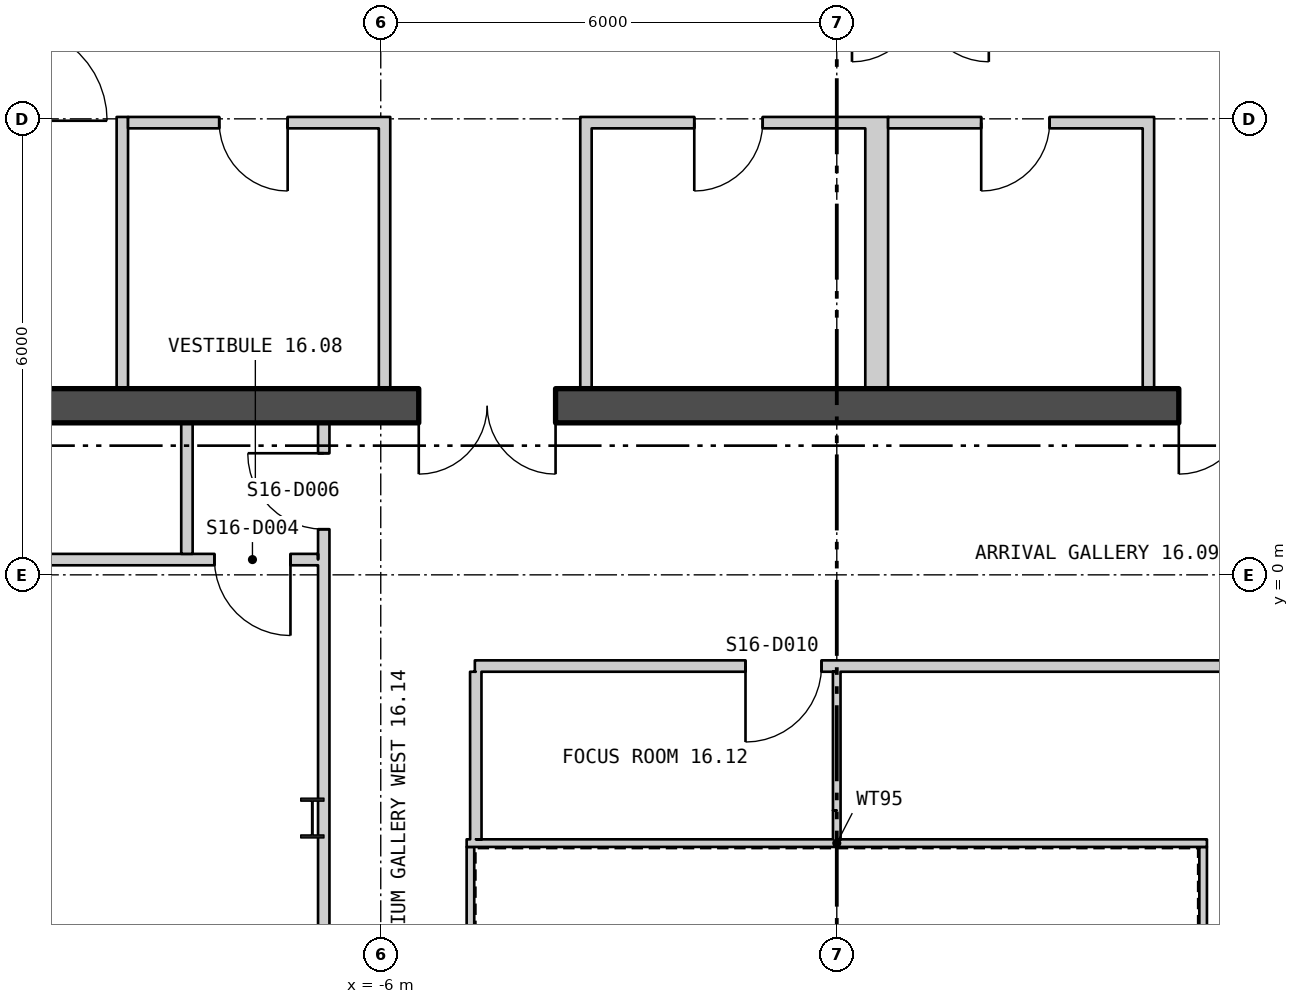
"""IFC4 building model, lengths in metres.
Left out: names, types, materials, properties, quantities, classifications, styles, units other than length and angle.
Written with IfcOpenShell. Run it as: python <this file> out.ifc"""

import sys

from ifc_helpers import new_model, si_unit, direction, frame, frame_2d, origin, origin_2d, place, context, subcontext, project, spatial, polyline, rectangle, i_section, outline, extrude, element, fill, save


model = new_model("IFC4")
c1 = context("Model", 3, precision=1e-05, world=origin(), true_north=direction((0.0, 1.0)))
c2 = subcontext(c1, "Body", "Model", "MODEL_VIEW")
j1 = project(units=[si_unit("LENGTHUNIT", "METRE"), si_unit("PLANEANGLEUNIT", "RADIAN")], contexts=[c1])
p1 = place(None, origin())
s1 = spatial("IfcSite", under=j1, at=p1, CompositionType="ELEMENT")
p2 = place(p1, origin())
s2 = spatial("IfcBuilding", under=s1, at=p2, CompositionType="ELEMENT")
p3 = place(p2, frame((0.0, 0.0, 216.0)))
s3 = spatial("IfcBuildingStorey", under=s2, at=p3, CompositionType="ELEMENT", Elevation=216.0)
p4 = place(p3, frame((-6.9, -3.2, 0.0), z_axis=(0.0, 0.0, 1.0), x_axis=(1.0, 0.0, 0.0)))
e1 = element("IfcColumn", 1, at=p4, inside=s3, PredefinedType="COLUMN", context=c2, shape_type="SweptSolid", body=[
    extrude(i_section(OverallWidth=0.306, OverallDepth=0.524, WebThickness=0.021, FlangeThickness=0.04, at=origin_2d()), origin(), (0.0, 0.0, 1.0), 3.9),
])
p5 = place(p3, frame((-26.235, 14.155, -0.18), z_axis=(0.0, 0.0, 1.0), x_axis=(0.500000335318, -0.866025210188, 0.0)))
e2 = element("IfcWall", 2, at=p5, inside=s3, PredefinedType="SOLIDWALL", context=c2, shape_type="SweptSolid", body=[
    extrude(outline(polyline([(-0.13, -0.225), (45.88, -0.225), (45.62, 0.225), (0.13, 0.225), (-0.13, -0.225)])), origin(), (0.0, 0.0, 1.0), 3.68),
])
p6 = place(p5, frame((1.425, 0.0, 1.08)))
e3 = element("IfcOpeningElement", 3, at=p6, cuts=e2, PredefinedType="OPENING", context=c2, shape_type="SweptSolid", body=[
    extrude(rectangle(XDim=2.4, YDim=2.0, at=frame_2d((1.2, 1.0))), frame((0.0, 0.235, 0.0), z_axis=(0.0, -1.0, 0.0), x_axis=(1.0, 0.0, 0.0)), (0.0, 0.0, 1.0), 0.47),
])
p7 = place(p5, frame((5.895, 0.0, 1.08)))
e4 = element("IfcOpeningElement", 4, at=p7, cuts=e2, PredefinedType="OPENING", context=c2, shape_type="SweptSolid", body=[
    extrude(rectangle(XDim=2.4, YDim=2.0, at=frame_2d((1.2, 1.0))), frame((0.0, 0.235, 0.0), z_axis=(0.0, -1.0, 0.0), x_axis=(1.0, 0.0, 0.0)), (0.0, 0.0, 1.0), 0.47),
])
p8 = place(p5, frame((10.403, 0.0, 1.08)))
e5 = element("IfcOpeningElement", 5, at=p8, cuts=e2, PredefinedType="OPENING", context=c2, shape_type="SweptSolid", body=[
    extrude(rectangle(XDim=2.4, YDim=2.0, at=frame_2d((1.2, 1.0))), frame((0.0, 0.235, 0.0), z_axis=(0.0, -1.0, 0.0), x_axis=(1.0, 0.0, 0.0)), (0.0, 0.0, 1.0), 0.47),
])
p9 = place(p5, frame((19.421, 0.0, 1.08)))
e6 = element("IfcOpeningElement", 6, at=p9, cuts=e2, PredefinedType="OPENING", context=c2, shape_type="SweptSolid", body=[
    extrude(rectangle(XDim=2.4, YDim=2.0, at=frame_2d((1.2, 1.0))), frame((0.0, 0.235, 0.0), z_axis=(0.0, -1.0, 0.0), x_axis=(1.0, 0.0, 0.0)), (0.0, 0.0, 1.0), 0.47),
])
p10 = place(p5, frame((23.929, 0.0, 1.08)))
e7 = element("IfcOpeningElement", 7, at=p10, cuts=e2, PredefinedType="OPENING", context=c2, shape_type="SweptSolid", body=[
    extrude(rectangle(XDim=2.4, YDim=2.0, at=frame_2d((1.2, 1.0))), frame((0.0, 0.235, 0.0), z_axis=(0.0, -1.0, 0.0), x_axis=(1.0, 0.0, 0.0)), (0.0, 0.0, 1.0), 0.47),
])
p11 = place(p5, frame((28.438, 0.0, 1.08)))
e8 = element("IfcOpeningElement", 8, at=p11, cuts=e2, PredefinedType="OPENING", context=c2, shape_type="SweptSolid", body=[
    extrude(rectangle(XDim=2.4, YDim=2.0, at=frame_2d((1.2, 1.0))), frame((0.0, 0.235, 0.0), z_axis=(0.0, -1.0, 0.0), x_axis=(1.0, 0.0, 0.0)), (0.0, 0.0, 1.0), 0.47),
])
p12 = place(p5, frame((32.947, 0.0, 1.08)))
e9 = element("IfcOpeningElement", 9, at=p12, cuts=e2, PredefinedType="OPENING", context=c2, shape_type="SweptSolid", body=[
    extrude(rectangle(XDim=2.4, YDim=2.0, at=frame_2d((1.2, 1.0))), frame((0.0, 0.235, 0.0), z_axis=(0.0, -1.0, 0.0), x_axis=(1.0, 0.0, 0.0)), (0.0, 0.0, 1.0), 0.47),
])
p13 = place(p5, frame((41.925, 0.0, 1.08)))
e10 = element("IfcOpeningElement", 10, at=p13, cuts=e2, PredefinedType="OPENING", context=c2, shape_type="SweptSolid", body=[
    extrude(rectangle(XDim=2.4, YDim=2.0, at=frame_2d((1.2, 1.0))), frame((0.0, 0.235, 0.0), z_axis=(0.0, -1.0, 0.0), x_axis=(1.0, 0.0, 0.0)), (0.0, 0.0, 1.0), 0.47),
])
p14 = place(p3, frame((3.36, -25.466, -0.18), z_axis=(0.0, 0.0, 1.0), x_axis=(0.500000335318, 0.866025210188, 0.0)))
e11 = element("IfcWall", 11, at=p14, inside=s3, PredefinedType="SOLIDWALL", context=c2, shape_type="SweptSolid", body=[
    extrude(outline(polyline([(-0.13, -0.225), (45.88, -0.225), (45.62, 0.225), (0.13, 0.225), (-0.13, -0.225)])), origin(), (0.0, 0.0, 1.0), 3.68),
])
p15 = place(p14, frame((1.425, 0.0, 1.08)))
e12 = element("IfcOpeningElement", 12, at=p15, cuts=e11, PredefinedType="OPENING", context=c2, shape_type="SweptSolid", body=[
    extrude(rectangle(XDim=2.4, YDim=2.0, at=frame_2d((1.2, 1.0))), frame((0.0, 0.235, 0.0), z_axis=(0.0, -1.0, 0.0), x_axis=(1.0, 0.0, 0.0)), (0.0, 0.0, 1.0), 0.47),
])
p16 = place(p14, frame((5.895, 0.0, 1.08)))
e13 = element("IfcOpeningElement", 13, at=p16, cuts=e11, PredefinedType="OPENING", context=c2, shape_type="SweptSolid", body=[
    extrude(rectangle(XDim=2.4, YDim=2.0, at=frame_2d((1.2, 1.0))), frame((0.0, 0.235, 0.0), z_axis=(0.0, -1.0, 0.0), x_axis=(1.0, 0.0, 0.0)), (0.0, 0.0, 1.0), 0.47),
])
p17 = place(p14, frame((10.403, 0.0, 1.08)))
e14 = element("IfcOpeningElement", 14, at=p17, cuts=e11, PredefinedType="OPENING", context=c2, shape_type="SweptSolid", body=[
    extrude(rectangle(XDim=2.4, YDim=2.0, at=frame_2d((1.2, 1.0))), frame((0.0, 0.235, 0.0), z_axis=(0.0, -1.0, 0.0), x_axis=(1.0, 0.0, 0.0)), (0.0, 0.0, 1.0), 0.47),
])
p18 = place(p14, frame((14.912, 0.0, 1.08)))
e15 = element("IfcOpeningElement", 15, at=p18, cuts=e11, PredefinedType="OPENING", context=c2, shape_type="SweptSolid", body=[
    extrude(rectangle(XDim=2.4, YDim=2.0, at=frame_2d((1.2, 1.0))), frame((0.0, 0.235, 0.0), z_axis=(0.0, -1.0, 0.0), x_axis=(1.0, 0.0, 0.0)), (0.0, 0.0, 1.0), 0.47),
])
p19 = place(p14, frame((19.421, 0.0, 1.08)))
e16 = element("IfcOpeningElement", 16, at=p19, cuts=e11, PredefinedType="OPENING", context=c2, shape_type="SweptSolid", body=[
    extrude(rectangle(XDim=2.4, YDim=2.0, at=frame_2d((1.2, 1.0))), frame((0.0, 0.235, 0.0), z_axis=(0.0, -1.0, 0.0), x_axis=(1.0, 0.0, 0.0)), (0.0, 0.0, 1.0), 0.47),
])
p20 = place(p14, frame((23.929, 0.0, 1.08)))
e17 = element("IfcOpeningElement", 17, at=p20, cuts=e11, PredefinedType="OPENING", context=c2, shape_type="SweptSolid", body=[
    extrude(rectangle(XDim=2.4, YDim=2.0, at=frame_2d((1.2, 1.0))), frame((0.0, 0.235, 0.0), z_axis=(0.0, -1.0, 0.0), x_axis=(1.0, 0.0, 0.0)), (0.0, 0.0, 1.0), 0.47),
])
p21 = place(p14, frame((32.947, 0.0, 1.08)))
e18 = element("IfcOpeningElement", 18, at=p21, cuts=e11, PredefinedType="OPENING", context=c2, shape_type="SweptSolid", body=[
    extrude(rectangle(XDim=2.4, YDim=2.0, at=frame_2d((1.2, 1.0))), frame((0.0, 0.235, 0.0), z_axis=(0.0, -1.0, 0.0), x_axis=(1.0, 0.0, 0.0)), (0.0, 0.0, 1.0), 0.47),
])
p22 = place(p14, frame((37.455, 0.0, 1.08)))
e19 = element("IfcOpeningElement", 19, at=p22, cuts=e11, PredefinedType="OPENING", context=c2, shape_type="SweptSolid", body=[
    extrude(rectangle(XDim=2.4, YDim=2.0, at=frame_2d((1.2, 1.0))), frame((0.0, 0.235, 0.0), z_axis=(0.0, -1.0, 0.0), x_axis=(1.0, 0.0, 0.0)), (0.0, 0.0, 1.0), 0.47),
])
p23 = place(p14, frame((41.925, 0.0, 1.08)))
e20 = element("IfcOpeningElement", 20, at=p23, cuts=e11, PredefinedType="OPENING", context=c2, shape_type="SweptSolid", body=[
    extrude(rectangle(XDim=2.4, YDim=2.0, at=frame_2d((1.2, 1.0))), frame((0.0, 0.235, 0.0), z_axis=(0.0, -1.0, 0.0), x_axis=(1.0, 0.0, 0.0)), (0.0, 0.0, 1.0), 0.47),
])
p24 = place(p3, frame((4.82, -11.62, 0.0), z_axis=(0.0, 0.0, 1.0), x_axis=(0.0, 1.0, 0.0)))
e21 = element("IfcWall", 21, at=p24, inside=s3, PredefinedType="PARTITIONING", context=c2, shape_type="SweptSolid", body=[
    extrude(rectangle(XDim=8.04, YDim=0.1, at=frame_2d((4.02, 0.0))), origin(), (0.0, 0.0, 1.0), 3.7),
])
p25 = place(p3, frame((4.87, -3.53, 0.0), z_axis=(0.0, 0.0, 1.0), x_axis=(-1.0, 0.0, 0.0)))
e22 = element("IfcWall", 22, at=p25, inside=s3, PredefinedType="PARTITIONING", context=c2, shape_type="SweptSolid", body=[
    extrude(rectangle(XDim=9.74, YDim=0.1, at=frame_2d((4.87, 0.0))), origin(), (0.0, 0.0, 1.0), 3.7),
])
p26 = place(p3, frame((-4.82, -3.58, 0.0), z_axis=(0.0, 0.0, 1.0), x_axis=(0.0, -1.0, 0.0)))
e23 = element("IfcWall", 23, at=p26, inside=s3, PredefinedType="PARTITIONING", context=c2, shape_type="SweptSolid", body=[
    extrude(rectangle(XDim=8.04, YDim=0.1, at=frame_2d((4.02, 0.0))), origin(), (0.0, 0.0, 1.0), 3.7),
])
p27 = place(p3, frame((-16.2, 2.225, 0.0), z_axis=(0.0, 0.0, 1.0), x_axis=(1.0, 0.0, 0.0)))
e24 = element("IfcWall", 24, at=p27, inside=s3, PredefinedType="SHEAR", context=c2, shape_type="SweptSolid", body=[
    extrude(rectangle(XDim=32.4, YDim=0.45, at=frame_2d((16.2, 0.0))), origin(), (0.0, 0.0, 1.0), 3.7),
])
p28 = place(p27, frame((10.7, 0.0, 0.0)))
e25 = element("IfcOpeningElement", 25, at=p28, cuts=e24, PredefinedType="OPENING", context=c2, shape_type="SweptSolid", body=[
    extrude(rectangle(XDim=1.8, YDim=2.4, at=frame_2d((0.9, 1.2))), frame((0.0, 0.235, 0.0), z_axis=(0.0, -1.0, 0.0), x_axis=(1.0, 0.0, 0.0)), (0.0, 0.0, 1.0), 0.47),
])
p29 = place(p27, frame((20.7, 0.0, 0.0)))
e26 = element("IfcOpeningElement", 26, at=p29, cuts=e24, PredefinedType="OPENING", context=c2, shape_type="SweptSolid", body=[
    extrude(rectangle(XDim=1.8, YDim=2.4, at=frame_2d((0.9, 1.2))), frame((0.0, 0.235, 0.0), z_axis=(0.0, -1.0, 0.0), x_axis=(1.0, 0.0, 0.0)), (0.0, 0.0, 1.0), 0.47),
])
for number, where, z_axis, x_axis in (
    (27, (-9.4, 2.45, 0.0), (0.0, 0.0, 1.0), (0.0, 1.0, 0.0)),
    (28, (-5.95, 2.45, 0.0), (0.0, 0.0, 1.0), (0.0, 1.0, 0.0)),
):
    element("IfcWall", number, at=place(p3, frame(where, z_axis=z_axis, x_axis=x_axis)), inside=s3, PredefinedType="PARTITIONING", context=c2, shape_type="SweptSolid", body=[
        extrude(rectangle(XDim=3.575, YDim=0.15, at=frame_2d((1.788, 0.0))), origin(), (0.0, 0.0, 1.0), 3.7),
    ])
p30 = place(p3, frame((-9.325, 5.95, 0.0), z_axis=(0.0, 0.0, 1.0), x_axis=(1.0, 0.0, 0.0)))
e29 = element("IfcWall", 29, at=p30, inside=s3, PredefinedType="PARTITIONING", context=c2, shape_type="SweptSolid", body=[
    extrude(rectangle(XDim=3.3, YDim=0.15, at=frame_2d((1.65, 0.0))), origin(), (0.0, 0.0, 1.0), 3.7),
])
p31 = place(p30, frame((1.2, 0.0, 0.0)))
e30 = element("IfcOpeningElement", 30, at=p31, cuts=e29, PredefinedType="OPENING", context=c2, shape_type="SweptSolid", body=[
    extrude(rectangle(XDim=0.9, YDim=2.1, at=frame_2d((0.45, 1.05))), frame((0.0, 0.085, 0.0), z_axis=(0.0, -1.0, 0.0), x_axis=(1.0, 0.0, 0.0)), (0.0, 0.0, 1.0), 0.17),
])
for number, where, z_axis, x_axis in (
    (31, (-3.3, 2.45, 0.0), (0.0, 0.0, 1.0), (0.0, 1.0, 0.0)),
    (32, (0.45, 2.45, 0.0), (0.0, 0.0, 1.0), (0.0, 1.0, 0.0)),
):
    element("IfcWall", number, at=place(p3, frame(where, z_axis=z_axis, x_axis=x_axis)), inside=s3, PredefinedType="PARTITIONING", context=c2, shape_type="SweptSolid", body=[
        extrude(rectangle(XDim=3.575, YDim=0.15, at=frame_2d((1.788, 0.0))), origin(), (0.0, 0.0, 1.0), 3.7),
    ])
p32 = place(p3, frame((-3.225, 5.95, 0.0), z_axis=(0.0, 0.0, 1.0), x_axis=(1.0, 0.0, 0.0)))
e33 = element("IfcWall", 33, at=p32, inside=s3, PredefinedType="PARTITIONING", context=c2, shape_type="SweptSolid", body=[
    extrude(rectangle(XDim=3.6, YDim=0.15, at=frame_2d((1.8, 0.0))), origin(), (0.0, 0.0, 1.0), 3.7),
])
p33 = place(p32, frame((1.35, 0.0, 0.0)))
e34 = element("IfcOpeningElement", 34, at=p33, cuts=e33, PredefinedType="OPENING", context=c2, shape_type="SweptSolid", body=[
    extrude(rectangle(XDim=0.9, YDim=2.1, at=frame_2d((0.45, 1.05))), frame((0.0, 0.085, 0.0), z_axis=(0.0, -1.0, 0.0), x_axis=(1.0, 0.0, 0.0)), (0.0, 0.0, 1.0), 0.17),
])
for number, where, z_axis, x_axis in (
    (35, (0.6, 2.45, 0.0), (0.0, 0.0, 1.0), (0.0, 1.0, 0.0)),
    (36, (4.1, 2.45, 0.0), (0.0, 0.0, 1.0), (0.0, 1.0, 0.0)),
):
    element("IfcWall", number, at=place(p3, frame(where, z_axis=z_axis, x_axis=x_axis)), inside=s3, PredefinedType="PARTITIONING", context=c2, shape_type="SweptSolid", body=[
        extrude(rectangle(XDim=3.575, YDim=0.15, at=frame_2d((1.788, 0.0))), origin(), (0.0, 0.0, 1.0), 3.7),
    ])
p34 = place(p3, frame((0.675, 5.95, 0.0), z_axis=(0.0, 0.0, 1.0), x_axis=(1.0, 0.0, 0.0)))
e37 = element("IfcWall", 37, at=p34, inside=s3, PredefinedType="PARTITIONING", context=c2, shape_type="SweptSolid", body=[
    extrude(rectangle(XDim=3.35, YDim=0.15, at=frame_2d((1.675, 0.0))), origin(), (0.0, 0.0, 1.0), 3.7),
])
p35 = place(p34, frame((1.225, 0.0, 0.0)))
e38 = element("IfcOpeningElement", 38, at=p35, cuts=e37, PredefinedType="OPENING", context=c2, shape_type="SweptSolid", body=[
    extrude(rectangle(XDim=0.9, YDim=2.1, at=frame_2d((0.45, 1.05))), frame((0.0, 0.085, 0.0), z_axis=(0.0, -1.0, 0.0), x_axis=(1.0, 0.0, 0.0)), (0.0, 0.0, 1.0), 0.17),
])
p36 = place(p3, frame((-17.918, 0.2, 0.0), z_axis=(0.0, 0.0, 1.0), x_axis=(0.999999995937, 9.0146939e-05, 0.0)))
e39 = element("IfcWall", 39, at=p36, inside=s3, PredefinedType="PARTITIONING", context=c2, shape_type="SweptSolid", body=[
    extrude(rectangle(XDim=11.093, YDim=0.15, at=frame_2d((5.546, 0.0))), origin(), (0.0, 0.0, 1.0), 3.7),
])
p37 = place(p36, frame((9.73, 0.0, 0.0)))
e40 = element("IfcOpeningElement", 40, at=p37, cuts=e39, PredefinedType="OPENING", context=c2, shape_type="SweptSolid", body=[
    extrude(rectangle(XDim=1.0, YDim=2.1, at=frame_2d((0.5, 1.05))), frame((0.0, 0.085, 0.0), z_axis=(0.0, -1.0, 0.0), x_axis=(1.0, 0.0, 0.0)), (0.0, 0.0, 1.0), 0.17),
])
p38 = place(p3, frame((-8.55, 0.276, 0.0), z_axis=(0.0, 0.0, 1.0), x_axis=(0.0, 1.0, 0.0)))
e41 = element("IfcWall", 41, at=p38, inside=s3, PredefinedType="PARTITIONING", context=c2, shape_type="SweptSolid", body=[
    extrude(rectangle(XDim=1.723, YDim=0.15, at=frame_2d((0.862, 0.0))), origin(), (0.0, 0.0, 1.0), 3.7),
])
p39 = place(p3, frame((-6.75, -13.675, 0.0), z_axis=(0.0, 0.0, 1.0), x_axis=(0.0, 1.0, 0.0)))
e42 = element("IfcWall", 42, at=p39, inside=s3, PredefinedType="PARTITIONING", context=c2, shape_type="SweptSolid", body=[
    extrude(rectangle(XDim=10.263, YDim=0.15, at=frame_2d((5.131, 0.0))), origin(), (0.0, 0.0, 1.0), 3.11),
])
p40 = place(p39, frame((2.455, 0.0, 0.0)))
e43 = element("IfcOpeningElement", 43, at=p40, cuts=e42, PredefinedType="OPENING", context=c2, shape_type="SweptSolid", body=[
    extrude(rectangle(XDim=1.0, YDim=2.1, at=frame_2d((0.5, 1.05))), frame((0.0, 0.085, 0.0), z_axis=(0.0, -1.0, 0.0), x_axis=(1.0, 0.0, 0.0)), (0.0, 0.0, 1.0), 0.17),
])
p41 = place(p3, frame((-6.75, -3.412, 0.0), z_axis=(0.0, 0.0, 1.0), x_axis=(0.0, 1.0, 0.0)))
e44 = element("IfcWall", 44, at=p41, inside=s3, PredefinedType="PARTITIONING", context=c2, shape_type="SweptSolid", body=[
    extrude(rectangle(XDim=5.412, YDim=0.15, at=frame_2d((2.706, 0.0))), origin(), (0.0, 0.0, 1.0), 3.7),
])
p42 = place(p41, frame((4.012, 0.0, 0.0)))
e45 = element("IfcOpeningElement", 45, at=p42, cuts=e44, PredefinedType="OPENING", context=c2, shape_type="SweptSolid", body=[
    extrude(rectangle(XDim=1.0, YDim=2.1, at=frame_2d((0.5, 1.05))), frame((0.0, 0.085, 0.0), z_axis=(0.0, -1.0, 0.0), x_axis=(1.0, 0.0, 0.0)), (0.0, 0.0, 1.0), 0.17),
])
p43 = place(p3, frame((-4.762, -1.2, 0.0), z_axis=(0.0, 0.0, 1.0), x_axis=(1.0, 0.0, 0.0)))
e46 = element("IfcWall", 46, at=p43, inside=s3, PredefinedType="PARTITIONING", context=c2, shape_type="SweptSolid", body=[
    extrude(rectangle(XDim=11.587, YDim=0.15, at=frame_2d((5.793, 0.0))), origin(), (0.0, 0.0, 1.0), 3.7),
])
p44 = place(p43, frame((3.561, 0.0, 0.0)))
e47 = element("IfcOpeningElement", 47, at=p44, cuts=e46, PredefinedType="OPENING", context=c2, shape_type="SweptSolid", body=[
    extrude(rectangle(XDim=1.0, YDim=2.1, at=frame_2d((0.5, 1.05))), frame((0.0, 0.085, 0.0), z_axis=(0.0, -1.0, 0.0), x_axis=(1.0, 0.0, 0.0)), (0.0, 0.0, 1.0), 0.17),
])
p45 = place(p3, frame((-4.75, -1.275, 0.0), z_axis=(0.0, 0.0, 1.0), x_axis=(0.000453514693, -0.999999897162, 0.0)))
e48 = element("IfcWall", 48, at=p45, inside=s3, PredefinedType="PARTITIONING", context=c2, shape_type="SweptSolid", body=[
    extrude(rectangle(XDim=2.205, YDim=0.15, at=frame_2d((1.103, 0.0))), origin(), (0.0, 0.0, 1.0), 3.7),
])
p46 = place(p3, frame((-0.001, -1.275, 0.0), z_axis=(0.0, 0.0, 1.0), x_axis=(0.000438356122, -0.999999903922, 0.0)))
e49 = element("IfcWall", 49, at=p46, inside=s3, PredefinedType="PARTITIONING", context=c2, shape_type="SweptSolid", body=[
    extrude(rectangle(XDim=1.825, YDim=0.1, at=frame_2d((0.912, 0.0))), origin(), (0.0, 0.0, 1.0), 3.15),
])
p47 = place(p3, frame((-0.0, -3.1, 0.0), z_axis=(0.0, 0.0, 1.0), x_axis=(0.000526315717, -0.999999861496, 0.0)))
e50 = element("IfcWall", 50, at=p47, inside=s3, PredefinedType="PARTITIONING", context=c2, shape_type="SweptSolid", body=[
    extrude(rectangle(XDim=0.38, YDim=0.1, at=frame_2d((0.19, 0.0))), origin(), (0.0, 0.0, 1.0), 3.7),
])
p48 = place(p31, origin())
e51 = element("IfcDoor", 51, at=p48, inside=s3, OperationType="SINGLE_SWING_RIGHT", PredefinedType="DOOR", context=c2, shape_type="SweptSolid", body=[
    extrude(rectangle(XDim=0.9, YDim=2.1, at=frame_2d((0.45, 1.05))), frame((0.0, 0.025, 0.0), z_axis=(0.0, -1.0, 0.0), x_axis=(1.0, 0.0, 0.0)), (0.0, 0.0, 1.0), 0.05),
])
fill(e30, e51)
p49 = place(p33, origin())
e52 = element("IfcDoor", 52, at=p49, inside=s3, OperationType="SINGLE_SWING_LEFT", PredefinedType="DOOR", context=c2, shape_type="SweptSolid", body=[
    extrude(rectangle(XDim=0.9, YDim=2.1, at=frame_2d((0.45, 1.05))), frame((0.0, 0.025, 0.0), z_axis=(0.0, -1.0, 0.0), x_axis=(1.0, 0.0, 0.0)), (0.0, 0.0, 1.0), 0.05),
])
fill(e34, e52)
p50 = place(p35, origin())
e53 = element("IfcDoor", 53, at=p50, inside=s3, OperationType="SINGLE_SWING_LEFT", PredefinedType="DOOR", context=c2, shape_type="SweptSolid", body=[
    extrude(rectangle(XDim=0.9, YDim=2.1, at=frame_2d((0.45, 1.05))), frame((0.0, 0.025, 0.0), z_axis=(0.0, -1.0, 0.0), x_axis=(1.0, 0.0, 0.0)), (0.0, 0.0, 1.0), 0.05),
])
fill(e38, e53)
p51 = place(p28, origin())
e54 = element("IfcDoor", 54, at=p51, inside=s3, OperationType="DOUBLE_DOOR_SINGLE_SWING", PredefinedType="DOOR", context=c2, shape_type="SweptSolid", body=[
    extrude(rectangle(XDim=1.8, YDim=2.4, at=frame_2d((0.9, 1.2))), frame((0.0, 0.025, 0.0), z_axis=(0.0, -1.0, 0.0), x_axis=(1.0, 0.0, 0.0)), (0.0, 0.0, 1.0), 0.05),
])
fill(e25, e54)
p52 = place(p29, origin())
e55 = element("IfcDoor", 55, at=p52, inside=s3, OperationType="DOUBLE_DOOR_SINGLE_SWING", PredefinedType="DOOR", context=c2, shape_type="SweptSolid", body=[
    extrude(rectangle(XDim=1.8, YDim=2.4, at=frame_2d((0.9, 1.2))), frame((0.0, 0.025, 0.0), z_axis=(0.0, -1.0, 0.0), x_axis=(1.0, 0.0, 0.0)), (0.0, 0.0, 1.0), 0.05),
])
fill(e26, e55)
p53 = place(p37, origin())
e56 = element("IfcDoor", 56, at=p53, inside=s3, OperationType="SINGLE_SWING_RIGHT", PredefinedType="DOOR", context=c2, shape_type="SweptSolid", body=[
    extrude(rectangle(XDim=1.0, YDim=2.1, at=frame_2d((0.5, 1.05))), frame((0.0, 0.025, 0.0), z_axis=(0.0, -1.0, 0.0), x_axis=(1.0, 0.0, 0.0)), (0.0, 0.0, 1.0), 0.05),
])
fill(e40, e56)
p54 = place(p42, origin())
e57 = element("IfcDoor", 57, at=p54, inside=s3, OperationType="SINGLE_SWING_LEFT", PredefinedType="DOOR", context=c2, shape_type="SweptSolid", body=[
    extrude(rectangle(XDim=1.0, YDim=2.1, at=frame_2d((0.5, 1.05))), frame((0.0, 0.025, 0.0), z_axis=(0.0, -1.0, 0.0), x_axis=(1.0, 0.0, 0.0)), (0.0, 0.0, 1.0), 0.05),
])
fill(e45, e57)
p55 = place(p44, origin())
e58 = element("IfcDoor", 58, at=p55, inside=s3, OperationType="SINGLE_SWING_LEFT", PredefinedType="DOOR", context=c2, shape_type="SweptSolid", body=[
    extrude(rectangle(XDim=1.0, YDim=2.1, at=frame_2d((0.5, 1.05))), frame((0.0, 0.025, 0.0), z_axis=(0.0, -1.0, 0.0), x_axis=(1.0, 0.0, 0.0)), (0.0, 0.0, 1.0), 0.05),
])
fill(e47, e58)
save(model, sys.argv[1])
